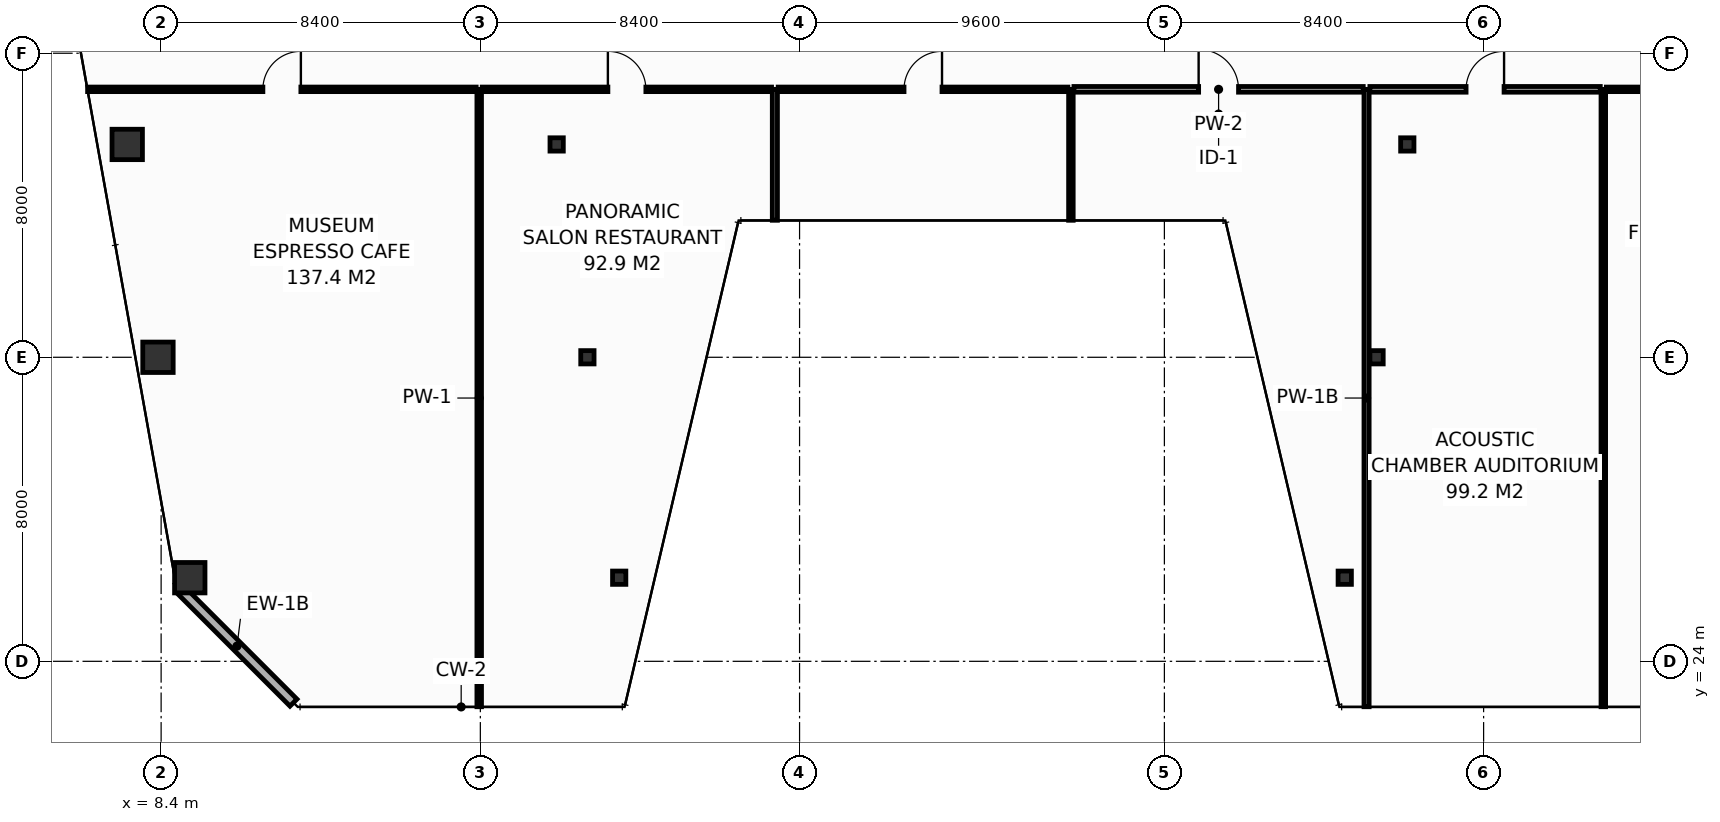
"""IFC4 building model, lengths in metres.
Left out: names, types, materials, properties, quantities, classifications, styles, units other than length and angle.
Written with IfcOpenShell. Run it as: python <this file> out.ifc"""

import sys

from ifc_helpers import new_model, si_unit, direction, frame, frame_2d, origin, origin_2d, place, context, subcontext, project, spatial, rectangle, hollow_rectangle, extrude, element, fill, save


model = new_model("IFC4")
c1 = context("Model", 3, precision=1e-05, world=origin(), true_north=direction((0.0, 1.0)))
c2 = subcontext(c1, "Body", "Model", "MODEL_VIEW")
j1 = project(units=[si_unit("LENGTHUNIT", "METRE"), si_unit("PLANEANGLEUNIT", "RADIAN")], contexts=[c1])
p1 = place(None, origin())
s1 = spatial("IfcSite", under=j1, at=p1, CompositionType="ELEMENT")
p2 = place(p1, origin())
s2 = spatial("IfcBuilding", under=s1, at=p2, CompositionType="ELEMENT")
p3 = place(p2, frame((0.0, 0.0, 257.2)))
s3 = spatial("IfcBuildingStorey", under=s2, at=p3, CompositionType="ELEMENT", Elevation=257.2)
p4 = place(p3, frame((9.154, 26.2, 0.0), z_axis=(0.0, 0.0, 1.0), x_axis=(1.0, 0.0, 0.0)))
e1 = element("IfcColumn", 1, at=p4, inside=s3, PredefinedType="COLUMN", context=c2, shape_type="SweptSolid", body=[
    extrude(hollow_rectangle(XDim=0.8, YDim=0.8, WallThickness=0.036, at=origin_2d()), origin(), (0.0, 0.0, 1.0), 3.8),
])
for number, where, z_axis, x_axis in (
    (2, (20.454, 26.2, 0.0), (0.0, 0.0, 1.0), (1.0, 0.0, 0.0)),
    (3, (39.546, 26.2, 0.0), (0.0, 0.0, 1.0), (1.0, 0.0, 0.0)),
):
    element("IfcColumn", number, at=place(p3, frame(where, z_axis=z_axis, x_axis=x_axis)), inside=s3, PredefinedType="COLUMN", context=c2, shape_type="SweptSolid", body=[
        extrude(hollow_rectangle(XDim=0.35, YDim=0.35, WallThickness=0.016, at=origin_2d()), origin(), (0.0, 0.0, 1.0), 3.8),
    ])
p5 = place(p3, frame((8.317, 32.0, 0.0), z_axis=(0.0, 0.0, 1.0), x_axis=(1.0, 0.0, 0.0)))
e4 = element("IfcColumn", 4, at=p5, inside=s3, PredefinedType="COLUMN", context=c2, shape_type="SweptSolid", body=[
    extrude(hollow_rectangle(XDim=0.8, YDim=0.8, WallThickness=0.036, at=origin_2d()), origin(), (0.0, 0.0, 1.0), 3.8),
])
for number, where, z_axis, x_axis in (
    (5, (19.617, 32.0, 0.0), (0.0, 0.0, 1.0), (1.0, 0.0, 0.0)),
    (6, (40.383, 32.0, 0.0), (0.0, 0.0, 1.0), (1.0, 0.0, 0.0)),
):
    element("IfcColumn", number, at=place(p3, frame(where, z_axis=z_axis, x_axis=x_axis)), inside=s3, PredefinedType="COLUMN", context=c2, shape_type="SweptSolid", body=[
        extrude(hollow_rectangle(XDim=0.35, YDim=0.35, WallThickness=0.016, at=origin_2d()), origin(), (0.0, 0.0, 1.0), 3.8),
    ])
p6 = place(p3, frame((7.508, 37.6, 0.0), z_axis=(0.0, 0.0, 1.0), x_axis=(1.0, 0.0, 0.0)))
e7 = element("IfcColumn", 7, at=p6, inside=s3, PredefinedType="COLUMN", context=c2, shape_type="SweptSolid", body=[
    extrude(hollow_rectangle(XDim=0.8, YDim=0.8, WallThickness=0.036, at=origin_2d()), origin(), (0.0, 0.0, 1.0), 3.8),
])
for number, where, z_axis, x_axis in (
    (8, (18.808, 37.6, 0.0), (0.0, 0.0, 1.0), (1.0, 0.0, 0.0)),
    (9, (41.192, 37.6, 0.0), (0.0, 0.0, 1.0), (1.0, 0.0, 0.0)),
):
    element("IfcColumn", number, at=place(p3, frame(where, z_axis=z_axis, x_axis=x_axis)), inside=s3, PredefinedType="COLUMN", context=c2, shape_type="SweptSolid", body=[
        extrude(hollow_rectangle(XDim=0.35, YDim=0.35, WallThickness=0.016, at=origin_2d()), origin(), (0.0, 0.0, 1.0), 3.8),
    ])
p7 = place(p3, frame((8.909, 25.887, 0.0), z_axis=(0.0, 0.0, 1.0), x_axis=(0.707106781187, -0.707106781187, 0.0)))
e10 = element("IfcWall", 10, at=p7, inside=s3, PredefinedType="STANDARD", context=c2, shape_type="SweptSolid", body=[
    extrude(rectangle(XDim=4.206, YDim=0.26, at=frame_2d((2.103, 0.0))), origin(), (0.0, 0.0, 1.0), 3.55),
])
p8 = place(p3, frame((16.77, 22.805, 0.0), z_axis=(0.0, 0.0, 1.0), x_axis=(0.0, 1.0, 0.0)))
e11 = element("IfcWall", 11, at=p8, inside=s3, PredefinedType="PARTITIONING", context=c2, shape_type="SweptSolid", body=[
    extrude(rectangle(XDim=16.245, YDim=0.12, at=frame_2d((8.123, 0.0))), origin(), (0.0, 0.0, 1.0), 2.947),
])
p9 = place(p3, frame((24.55, 35.605, 0.0), z_axis=(0.0, 0.0, 1.0), x_axis=(0.0, 1.0, 0.0)))
e12 = element("IfcWall", 12, at=p9, inside=s3, PredefinedType="PARTITIONING", context=c2, shape_type="SweptSolid", body=[
    extrude(rectangle(XDim=3.445, YDim=0.135, at=frame_2d((1.723, 0.0))), origin(), (0.0, 0.0, 1.0), 3.55),
])
p10 = place(p3, frame((32.34, 35.605, 0.0), z_axis=(0.0, 0.0, 1.0), x_axis=(0.0, 1.0, 0.0)))
e13 = element("IfcWall", 13, at=p10, inside=s3, PredefinedType="PARTITIONING", context=c2, shape_type="SweptSolid", body=[
    extrude(rectangle(XDim=3.445, YDim=0.12, at=frame_2d((1.723, 0.0))), origin(), (0.0, 0.0, 1.0), 3.55),
])
p11 = place(p3, frame((40.12, 22.805, 0.0), z_axis=(0.0, 0.0, 1.0), x_axis=(0.0, 1.0, 0.0)))
e14 = element("IfcWall", 14, at=p11, inside=s3, PredefinedType="PARTITIONING", context=c2, shape_type="SweptSolid", body=[
    extrude(rectangle(XDim=16.245, YDim=0.135, at=frame_2d((8.123, 0.0))), origin(), (0.0, 0.0, 1.0), 2.947),
])
p12 = place(p3, frame((46.35, 22.805, 0.0), z_axis=(0.0, 0.0, 1.0), x_axis=(0.0, 1.0, 0.0)))
e15 = element("IfcWall", 15, at=p12, inside=s3, PredefinedType="PARTITIONING", context=c2, shape_type="SweptSolid", body=[
    extrude(rectangle(XDim=16.245, YDim=0.12, at=frame_2d((8.123, 0.0))), origin(), (0.0, 0.0, 1.0), 2.947),
])
p13 = place(p3, frame((6.466, 39.05, 0.0), z_axis=(0.0, 0.0, 1.0), x_axis=(1.0, 0.0, 0.0)))
e16 = element("IfcWall", 16, at=p13, inside=s3, PredefinedType="PARTITIONING", context=c2, shape_type="SweptSolid", body=[
    extrude(rectangle(XDim=10.224, YDim=0.12, at=frame_2d((5.112, 0.0))), origin(), (0.0, 0.0, 1.0), 3.085),
])
p14 = place(p13, frame((4.612, 0.0, 0.0)))
e17 = element("IfcOpeningElement", 17, at=p14, cuts=e16, PredefinedType="OPENING", context=c2, shape_type="SweptSolid", body=[
    extrude(rectangle(XDim=1.0, YDim=2.15, at=frame_2d((0.5, 1.075))), frame((0.0, 0.07, 0.0), z_axis=(0.0, -1.0, 0.0), x_axis=(1.0, 0.0, 0.0)), (0.0, 0.0, 1.0), 0.14),
])
p15 = place(p3, frame((16.85, 39.05, 0.0), z_axis=(0.0, 0.0, 1.0), x_axis=(1.0, 0.0, 0.0)))
e18 = element("IfcWall", 18, at=p15, inside=s3, PredefinedType="PARTITIONING", context=c2, shape_type="SweptSolid", body=[
    extrude(rectangle(XDim=7.612, YDim=0.12, at=frame_2d((3.806, 0.0))), origin(), (0.0, 0.0, 1.0), 2.947),
])
p16 = place(p15, frame((3.306, 0.0, 0.0)))
e19 = element("IfcOpeningElement", 19, at=p16, cuts=e18, PredefinedType="OPENING", context=c2, shape_type="SweptSolid", body=[
    extrude(rectangle(XDim=1.0, YDim=2.15, at=frame_2d((0.5, 1.075))), frame((0.0, 0.07, 0.0), z_axis=(0.0, -1.0, 0.0), x_axis=(1.0, 0.0, 0.0)), (0.0, 0.0, 1.0), 0.14),
])
p17 = place(p3, frame((24.637, 39.05, 0.0), z_axis=(0.0, 0.0, 1.0), x_axis=(1.0, 0.0, 0.0)))
e20 = element("IfcWall", 20, at=p17, inside=s3, PredefinedType="PARTITIONING", context=c2, shape_type="SweptSolid", body=[
    extrude(rectangle(XDim=7.623, YDim=0.12, at=frame_2d((3.811, 0.0))), origin(), (0.0, 0.0, 1.0), 3.55),
])
p18 = place(p17, frame((3.311, 0.0, 0.0)))
e21 = element("IfcOpeningElement", 21, at=p18, cuts=e20, PredefinedType="OPENING", context=c2, shape_type="SweptSolid", body=[
    extrude(rectangle(XDim=1.0, YDim=2.15, at=frame_2d((0.5, 1.075))), frame((0.0, 0.07, 0.0), z_axis=(0.0, -1.0, 0.0), x_axis=(1.0, 0.0, 0.0)), (0.0, 0.0, 1.0), 0.14),
])
p19 = place(p3, frame((32.42, 39.05, 0.0), z_axis=(0.0, 0.0, 1.0), x_axis=(1.0, 0.0, 0.0)))
e22 = element("IfcWall", 22, at=p19, inside=s3, PredefinedType="PARTITIONING", context=c2, shape_type="SweptSolid", body=[
    extrude(rectangle(XDim=7.613, YDim=0.15, at=frame_2d((3.806, 0.0))), origin(), (0.0, 0.0, 1.0), 2.947),
])
p20 = place(p19, frame((3.281, 0.0, 0.0)))
e23 = element("IfcOpeningElement", 23, at=p20, cuts=e22, PredefinedType="OPENING", context=c2, shape_type="SweptSolid", body=[
    extrude(rectangle(XDim=1.05, YDim=2.15, at=frame_2d((0.525, 1.075))), frame((0.0, 0.085, 0.0), z_axis=(0.0, -1.0, 0.0), x_axis=(1.0, 0.0, 0.0)), (0.0, 0.0, 1.0), 0.17),
])
p21 = place(p3, frame((40.208, 39.05, 0.0), z_axis=(0.0, 0.0, 1.0), x_axis=(1.0, 0.0, 0.0)))
e24 = element("IfcWall", 24, at=p21, inside=s3, PredefinedType="PARTITIONING", context=c2, shape_type="SweptSolid", body=[
    extrude(rectangle(XDim=6.062, YDim=0.15, at=frame_2d((3.031, 0.0))), origin(), (0.0, 0.0, 1.0), 3.55),
])
p22 = place(p21, frame((2.531, 0.0, 0.0)))
e25 = element("IfcOpeningElement", 25, at=p22, cuts=e24, PredefinedType="OPENING", context=c2, shape_type="SweptSolid", body=[
    extrude(rectangle(XDim=1.0, YDim=2.15, at=frame_2d((0.5, 1.075))), frame((0.0, 0.085, 0.0), z_axis=(0.0, -1.0, 0.0), x_axis=(1.0, 0.0, 0.0)), (0.0, 0.0, 1.0), 0.17),
])
p23 = place(p3, frame((46.43, 39.05, 0.0), z_axis=(0.0, 0.0, 1.0), x_axis=(1.0, 0.0, 0.0)))
e26 = element("IfcWall", 26, at=p23, inside=s3, PredefinedType="PARTITIONING", context=c2, shape_type="SweptSolid", body=[
    extrude(rectangle(XDim=7.104, YDim=0.12, at=frame_2d((3.552, 0.0))), origin(), (0.0, 0.0, 1.0), 3.085),
])
p24 = place(p23, frame((3.102, 0.0, 0.0)))
e27 = element("IfcOpeningElement", 27, at=p24, cuts=e26, PredefinedType="OPENING", context=c2, shape_type="SweptSolid", body=[
    extrude(rectangle(XDim=0.9, YDim=2.1, at=frame_2d((0.45, 1.05))), frame((0.0, 0.07, 0.0), z_axis=(0.0, -1.0, 0.0), x_axis=(1.0, 0.0, 0.0)), (0.0, 0.0, 1.0), 0.14),
])
p25 = place(p14, origin())
e28 = element("IfcDoor", 28, at=p25, inside=s3, OperationType="SINGLE_SWING_RIGHT", PredefinedType="DOOR", context=c2, shape_type="SweptSolid", body=[
    extrude(rectangle(XDim=1.0, YDim=2.15, at=frame_2d((0.5, 1.075))), frame((0.0, 0.025, 0.0), z_axis=(0.0, -1.0, 0.0), x_axis=(1.0, 0.0, 0.0)), (0.0, 0.0, 1.0), 0.05),
])
fill(e17, e28)
p26 = place(p16, origin())
e29 = element("IfcDoor", 29, at=p26, inside=s3, OperationType="SINGLE_SWING_LEFT", PredefinedType="DOOR", context=c2, shape_type="SweptSolid", body=[
    extrude(rectangle(XDim=1.0, YDim=2.15, at=frame_2d((0.5, 1.075))), frame((0.0, 0.025, 0.0), z_axis=(0.0, -1.0, 0.0), x_axis=(1.0, 0.0, 0.0)), (0.0, 0.0, 1.0), 0.05),
])
fill(e19, e29)
p27 = place(p18, origin())
e30 = element("IfcDoor", 30, at=p27, inside=s3, OperationType="SINGLE_SWING_RIGHT", PredefinedType="DOOR", context=c2, shape_type="SweptSolid", body=[
    extrude(rectangle(XDim=1.0, YDim=2.15, at=frame_2d((0.5, 1.075))), frame((0.0, 0.025, 0.0), z_axis=(0.0, -1.0, 0.0), x_axis=(1.0, 0.0, 0.0)), (0.0, 0.0, 1.0), 0.05),
])
fill(e21, e30)
p28 = place(p20, origin())
e31 = element("IfcDoor", 31, at=p28, inside=s3, OperationType="SINGLE_SWING_LEFT", PredefinedType="DOOR", context=c2, shape_type="SweptSolid", body=[
    extrude(rectangle(XDim=1.05, YDim=2.15, at=frame_2d((0.525, 1.075))), frame((0.0, 0.025, 0.0), z_axis=(0.0, -1.0, 0.0), x_axis=(1.0, 0.0, 0.0)), (0.0, 0.0, 1.0), 0.05),
])
fill(e23, e31)
p29 = place(p22, origin())
e32 = element("IfcDoor", 32, at=p29, inside=s3, OperationType="SINGLE_SWING_RIGHT", PredefinedType="DOOR", context=c2, shape_type="SweptSolid", body=[
    extrude(rectangle(XDim=1.0, YDim=2.15, at=frame_2d((0.5, 1.075))), frame((0.0, 0.025, 0.0), z_axis=(0.0, -1.0, 0.0), x_axis=(1.0, 0.0, 0.0)), (0.0, 0.0, 1.0), 0.05),
])
fill(e25, e32)
save(model, sys.argv[1])
